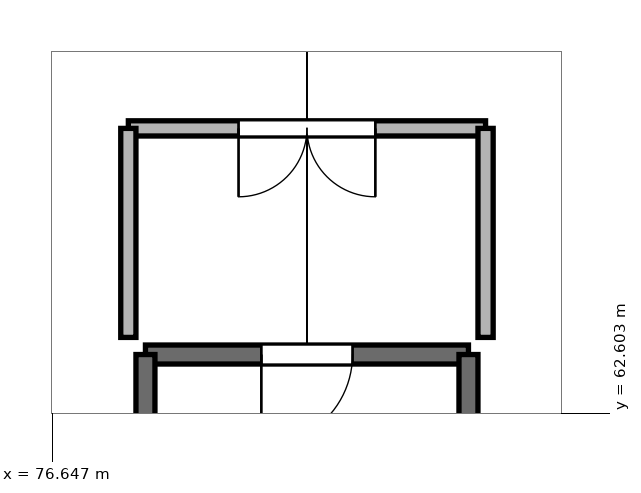
"""IFC4 building model, lengths in metres.
Left out: names, types, materials, properties, quantities, classifications, styles, units other than length and angle.
Written with IfcOpenShell. Run it as: python <this file> out.ifc"""

import sys

from ifc_helpers import new_model, si_unit, direction, frame, frame_2d, origin, place, context, subcontext, project, spatial, rectangle, extrude, element, fill, save


model = new_model("IFC4")
c1 = context("Model", 3, precision=1e-05, world=origin(), true_north=direction((0.0, 1.0)))
c2 = subcontext(c1, "Body", "Model", "MODEL_VIEW")
j1 = project(units=[si_unit("LENGTHUNIT", "METRE"), si_unit("PLANEANGLEUNIT", "RADIAN")], contexts=[c1])
p1 = place(None, origin())
s1 = spatial("IfcSite", under=j1, at=p1, CompositionType="ELEMENT")
p2 = place(p1, origin())
s2 = spatial("IfcBuilding", under=s1, at=p2, CompositionType="ELEMENT")
p3 = place(p2, frame((0.0, 0.0, 43.8)))
s3 = spatial("IfcBuildingStorey", under=s2, at=p3, CompositionType="ELEMENT", Elevation=43.8)
p4 = place(p3, frame((82.125, 63.375, 0.0), z_axis=(0.0, 0.0, 1.0), x_axis=(-1.0, 0.0, 0.0)))
e1 = element("IfcWall", 1, at=p4, inside=s3, PredefinedType="SHEAR", context=c2, shape_type="SweptSolid", body=[
    extrude(rectangle(XDim=4.25, YDim=0.25, at=frame_2d((2.125, 0.0))), origin(), (0.0, 0.0, 1.0), 3.02),
])
p5 = place(p4, frame((1.525, 0.0, 0.0)))
e2 = element("IfcOpeningElement", 2, at=p5, cuts=e1, PredefinedType="OPENING", context=c2, shape_type="SweptSolid", body=[
    extrude(rectangle(XDim=1.2, YDim=2.2, at=frame_2d((0.6, 1.1))), frame((0.0, 0.137, 0.0), z_axis=(0.0, -1.0, 0.0), x_axis=(1.0, 0.0, 0.0)), (0.0, 0.0, 1.0), 0.274),
])
for number, where, z_axis, x_axis in (
    (3, (77.875, 63.375, 0.0), (0.0, 0.0, 1.0), (0.0, -1.0, 0.0)),
    (4, (82.125, 56.175, 0.0), (0.0, 0.0, 1.0), (0.0, 1.0, 0.0)),
):
    element("IfcWall", number, at=place(p3, frame(where, z_axis=z_axis, x_axis=x_axis)), inside=s3, PredefinedType="SHEAR", context=c2, shape_type="SweptSolid", body=[
        extrude(rectangle(XDim=7.2, YDim=0.25, at=frame_2d((3.6, 0.0))), origin(), (0.0, 0.0, 1.0), 3.02),
    ])
p6 = place(p3, frame((77.65, 66.35, 0.0), z_axis=(0.0, 0.0, 1.0), x_axis=(1.0, 0.0, 0.0)))
e5 = element("IfcWall", 5, at=p6, inside=s3, PredefinedType="PARTITIONING", context=c2, shape_type="SweptSolid", body=[
    extrude(rectangle(XDim=4.7, YDim=0.2, at=frame_2d((2.35, 0.0))), origin(), (0.0, 0.0, 1.0), 2.53),
])
p7 = place(p6, frame((1.45, 0.0, 0.0)))
e6 = element("IfcOpeningElement", 6, at=p7, cuts=e5, PredefinedType="OPENING", context=c2, shape_type="SweptSolid", body=[
    extrude(rectangle(XDim=1.8, YDim=2.2, at=frame_2d((0.9, 1.1))), frame((0.0, 0.112, 0.0), z_axis=(0.0, -1.0, 0.0), x_axis=(1.0, 0.0, 0.0)), (0.0, 0.0, 1.0), 0.224),
])
for number, where, z_axis, x_axis in (
    (7, (77.65, 63.6, 0.0), (0.0, 0.0, 1.0), (0.0, 1.0, 0.0)),
    (8, (82.35, 63.6, 0.0), (0.0, 0.0, 1.0), (0.0, 1.0, 0.0)),
):
    element("IfcWall", number, at=place(p3, frame(where, z_axis=z_axis, x_axis=x_axis)), inside=s3, PredefinedType="PARTITIONING", context=c2, shape_type="SweptSolid", body=[
        extrude(rectangle(XDim=2.75, YDim=0.2, at=frame_2d((1.375, 0.0))), origin(), (0.0, 0.0, 1.0), 2.53),
    ])
p8 = place(p5, origin())
e9 = element("IfcDoor", 9, at=p8, inside=s3, OperationType="SINGLE_SWING_RIGHT", PredefinedType="DOOR", context=c2, shape_type="SweptSolid", body=[
    extrude(rectangle(XDim=1.2, YDim=2.2, at=frame_2d((0.6, 1.1))), frame((0.0, 0.025, 0.0), z_axis=(0.0, -1.0, 0.0), x_axis=(1.0, 0.0, 0.0)), (0.0, 0.0, 1.0), 0.05),
])
fill(e2, e9)
p9 = place(p7, frame((1.8, 0.0, 0.0), z_axis=(0.0, 0.0, 1.0), x_axis=(-1.0, 0.0, 0.0)))
e10 = element("IfcDoor", 10, at=p9, inside=s3, OperationType="DOUBLE_DOOR_SINGLE_SWING", PredefinedType="DOOR", context=c2, shape_type="SweptSolid", body=[
    extrude(rectangle(XDim=1.8, YDim=2.2, at=frame_2d((0.9, 1.1))), frame((0.0, 0.025, 0.0), z_axis=(0.0, -1.0, 0.0), x_axis=(1.0, 0.0, 0.0)), (0.0, 0.0, 1.0), 0.05),
])
fill(e6, e10)
save(model, sys.argv[1])
